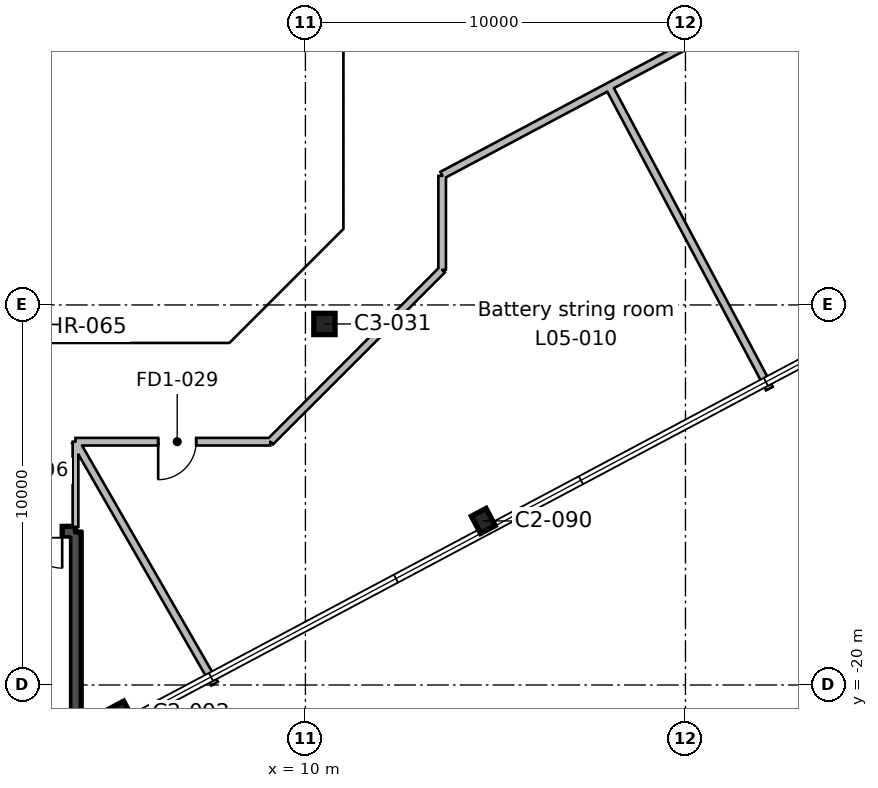
"""IFC4 building model, lengths in metres.
Left out: names, types, materials, properties, quantities, classifications, styles, units other than length and angle.
Written with IfcOpenShell. Run it as: python <this file> out.ifc"""

import sys

from ifc_helpers import new_model, si_unit, direction, frame, frame_2d, origin, origin_2d, place, context, subcontext, project, spatial, rectangle, hollow_rectangle, i_section, extrude, element, fill, save


model = new_model("IFC4")
c1 = context("Model", 3, precision=1e-05, world=origin(), true_north=direction((0.0, 1.0)))
c2 = subcontext(c1, "Body", "Model", "MODEL_VIEW")
j1 = project(units=[si_unit("LENGTHUNIT", "METRE"), si_unit("PLANEANGLEUNIT", "RADIAN")], contexts=[c1])
p1 = place(None, origin())
s1 = spatial("IfcSite", under=j1, at=p1, CompositionType="ELEMENT")
p2 = place(p1, origin())
s2 = spatial("IfcBuilding", under=s1, at=p2, CompositionType="ELEMENT")
p3 = place(p2, frame((0.0, 0.0, 28.4)))
s3 = spatial("IfcBuildingStorey", under=s2, at=p3, CompositionType="ELEMENT", Elevation=28.4)
for number, where, z_axis, x_axis in (
    (1, (5.146, -20.754, 0.0), (0.0, 0.0, 1.0), (0.883, 0.469, 0.0)),
    (2, (14.681, -15.683, 0.0), (0.0, 0.0, 1.0), (0.883, 0.469, 0.0)),
):
    element("IfcColumn", number, at=place(p3, frame(where, z_axis=z_axis, x_axis=x_axis)), inside=s3, PredefinedType="COLUMN", context=c2, shape_type="SweptSolid", body=[
        extrude(i_section(OverallWidth=0.437, OverallDepth=0.513, WebThickness=0.061, FlangeThickness=0.097, FilletRadius=0.015, at=origin_2d()), origin(), (0.0, 0.0, 1.0), 5.4),
    ])
p4 = place(p3, frame((10.5, -10.5, 0.0), z_axis=(0.0, 0.0, 1.0), x_axis=(1.0, 0.0, 0.0)))
e3 = element("IfcColumn", 3, at=p4, inside=s3, PredefinedType="COLUMN", context=c2, shape_type="SweptSolid", body=[
    extrude(hollow_rectangle(XDim=0.559, YDim=0.559, WallThickness=0.024, InnerFilletRadius=0.012, OuterFilletRadius=0.035, at=origin_2d()), origin(), (0.0, 0.0, 1.0), 5.4),
])
p5 = place(p3, frame((3.95, -15.975, 0.0), z_axis=(0.0, 0.0, 1.0), x_axis=(0.0, -1.0, 0.0)))
e4 = element("IfcWall", 4, at=p5, inside=s3, PredefinedType="SHEAR", context=c2, shape_type="SweptSolid", body=[
    extrude(rectangle(XDim=4.85, YDim=0.3, at=frame_2d((2.425, 0.0))), origin(), (0.0, 0.0, 1.0), 5.4),
])
p6 = place(p3, frame((-4.35, -15.975, 0.0), z_axis=(0.0, 0.0, 1.0), x_axis=(1.0, 0.0, 0.0)))
e5 = element("IfcWall", 5, at=p6, inside=s3, PredefinedType="SHEAR", context=c2, shape_type="SweptSolid", body=[
    extrude(rectangle(XDim=8.3, YDim=0.3, at=frame_2d((4.15, 0.0))), origin(), (0.0, 0.0, 1.0), 5.4),
])
p7 = place(p6, frame((6.05, 0.0, 0.0)))
e6 = element("IfcOpeningElement", 6, at=p7, cuts=e5, PredefinedType="OPENING", context=c2, shape_type="SweptSolid", body=[
    extrude(rectangle(XDim=1.9, YDim=2.1, at=frame_2d((0.95, 1.05))), frame((0.0, 0.16, 0.0), z_axis=(0.0, -1.0, 0.0), x_axis=(1.0, 0.0, 0.0)), (0.0, 0.0, 1.0), 0.32),
])
p8 = place(p3, frame((3.95, -13.598, 0.0), z_axis=(0.0, 0.0, 1.0), x_axis=(0.0, -1.0, 0.0)))
e7 = element("IfcWall", 7, at=p8, inside=s3, PredefinedType="PARTITIONING", context=c2, shape_type="SweptSolid", body=[
    extrude(rectangle(XDim=2.242, YDim=0.15, at=frame_2d((1.121, 0.0))), origin(), (0.0, 0.0, 1.0), 4.95),
])
p9 = place(p3, frame((13.598, -6.602, 0.0), z_axis=(0.0, 0.0, 1.0), x_axis=(0.0, -1.0, 0.0)))
e8 = element("IfcWall", 8, at=p9, inside=s3, PredefinedType="PARTITIONING", context=c2, shape_type="SweptSolid", body=[
    extrude(rectangle(XDim=2.474, YDim=0.2, at=frame_2d((1.237, 0.0))), origin(), (0.0, 0.0, 1.0), 4.95),
])
p10 = place(p3, frame((13.598, -9.076, 0.0), z_axis=(0.0, 0.0, 1.0), x_axis=(-0.707106781187, -0.707106781187, 0.0)))
e9 = element("IfcWall", 9, at=p10, inside=s3, PredefinedType="PARTITIONING", context=c2, shape_type="SweptSolid", body=[
    extrude(rectangle(XDim=6.395, YDim=0.2, at=frame_2d((3.198, 0.0))), origin(), (0.0, 0.0, 1.0), 4.95),
])
p11 = place(p3, frame((9.076, -13.598, 0.0), z_axis=(0.0, 0.0, 1.0), x_axis=(-1.0, 0.0, 0.0)))
e10 = element("IfcWall", 10, at=p11, inside=s3, PredefinedType="PARTITIONING", context=c2, shape_type="SweptSolid", body=[
    extrude(rectangle(XDim=5.126, YDim=0.2, at=frame_2d((2.563, 0.0))), origin(), (0.0, 0.0, 1.0), 4.95),
])
p12 = place(p11, frame((1.95, 0.0, 0.0)))
e11 = element("IfcOpeningElement", 11, at=p12, cuts=e10, PredefinedType="OPENING", context=c2, shape_type="SweptSolid", body=[
    extrude(rectangle(XDim=1.0, YDim=2.1, at=frame_2d((0.5, 1.05))), frame((0.0, 0.11, 0.0), z_axis=(0.0, -1.0, 0.0), x_axis=(1.0, 0.0, 0.0)), (0.0, 0.0, 1.0), 0.22),
])
p13 = place(p3, frame((7.609, -19.965, 0.0), z_axis=(0.0, 0.0, 1.0), x_axis=(-0.498246245443, 0.867035569571, 0.0)))
e12 = element("IfcWall", 12, at=p13, inside=s3, PredefinedType="PARTITIONING", context=c2, shape_type="SweptSolid", body=[
    extrude(rectangle(XDim=7.344, YDim=0.2, at=frame_2d((3.672, 0.0))), origin(), (0.0, 0.0, 1.0), 4.95),
])
p14 = place(p3, frame((17.983, -4.253, 0.0), z_axis=(0.0, 0.0, 1.0), x_axis=(0.469430813661, -0.882969258347, 0.0)))
e13 = element("IfcWall", 13, at=p14, inside=s3, PredefinedType="PARTITIONING", context=c2, shape_type="SweptSolid", body=[
    extrude(rectangle(XDim=9.002, YDim=0.2, at=frame_2d((4.501, 0.0))), origin(), (0.0, 0.0, 1.0), 4.95),
])
p15 = place(p3, frame((69.475, 23.126, 0.0), z_axis=(0.0, 0.0, 1.0), x_axis=(-0.882944287046, -0.469477780063, 0.0)))
e14 = element("IfcWall", 14, at=p15, inside=s3, PredefinedType="PARTITIONING", context=c2, shape_type="SweptSolid", body=[
    extrude(rectangle(XDim=63.285, YDim=0.2, at=frame_2d((31.643, 0.0))), origin(), (0.0, 0.0, 1.0), 4.95),
])
p16 = place(p15, frame((47.47, 0.0, 0.0)))
e15 = element("IfcOpeningElement", 15, at=p16, cuts=e14, PredefinedType="OPENING", context=c2, shape_type="SweptSolid", body=[
    extrude(rectangle(XDim=1.0, YDim=2.1, at=frame_2d((0.5, 1.05))), frame((0.0, 0.11, 0.0), z_axis=(0.0, -1.0, 0.0), x_axis=(1.0, 0.0, 0.0)), (0.0, 0.0, 1.0), 0.22),
])
p17 = place(p15, frame((31.271, 0.0, 0.0)))
e16 = element("IfcOpeningElement", 16, at=p17, cuts=e14, PredefinedType="OPENING", context=c2, shape_type="SweptSolid", body=[
    extrude(rectangle(XDim=1.0, YDim=2.1, at=frame_2d((0.5, 1.05))), frame((0.0, 0.11, 0.0), z_axis=(0.0, -1.0, 0.0), x_axis=(1.0, 0.0, 0.0)), (0.0, 0.0, 1.0), 0.22),
])
p18 = place(p15, frame((24.07, 0.0, 0.0)))
e17 = element("IfcOpeningElement", 17, at=p18, cuts=e14, PredefinedType="OPENING", context=c2, shape_type="SweptSolid", body=[
    extrude(rectangle(XDim=1.0, YDim=2.1, at=frame_2d((0.5, 1.05))), frame((0.0, 0.11, 0.0), z_axis=(0.0, -1.0, 0.0), x_axis=(1.0, 0.0, 0.0)), (0.0, 0.0, 1.0), 0.22),
])
p19 = place(p15, frame((11.071, 0.0, 0.0)))
e18 = element("IfcOpeningElement", 18, at=p19, cuts=e14, PredefinedType="OPENING", context=c2, shape_type="SweptSolid", body=[
    extrude(rectangle(XDim=1.0, YDim=2.1, at=frame_2d((0.5, 1.05))), frame((0.0, 0.11, 0.0), z_axis=(0.0, -1.0, 0.0), x_axis=(1.0, 0.0, 0.0)), (0.0, 0.0, 1.0), 0.22),
])
p20 = place(p7, frame((1.9, 0.0, 0.0), z_axis=(0.0, 0.0, 1.0), x_axis=(-1.0, 0.0, 0.0)))
e19 = element("IfcDoor", 19, at=p20, inside=s3, OperationType="DOUBLE_DOOR_SINGLE_SWING", PredefinedType="DOOR", context=c2, shape_type="SweptSolid", body=[
    extrude(rectangle(XDim=1.9, YDim=2.1, at=frame_2d((0.95, 1.05))), frame((0.0, 0.025, 0.0), z_axis=(0.0, -1.0, 0.0), x_axis=(1.0, 0.0, 0.0)), (0.0, 0.0, 1.0), 0.05),
])
fill(e6, e19)
p21 = place(p12, origin())
e20 = element("IfcDoor", 20, at=p21, inside=s3, OperationType="SINGLE_SWING_RIGHT", PredefinedType="DOOR", context=c2, shape_type="SweptSolid", body=[
    extrude(rectangle(XDim=1.0, YDim=2.1, at=frame_2d((0.5, 1.05))), frame((0.0, 0.025, 0.0), z_axis=(0.0, -1.0, 0.0), x_axis=(1.0, 0.0, 0.0)), (0.0, 0.0, 1.0), 0.05),
])
fill(e11, e20)
save(model, sys.argv[1])
